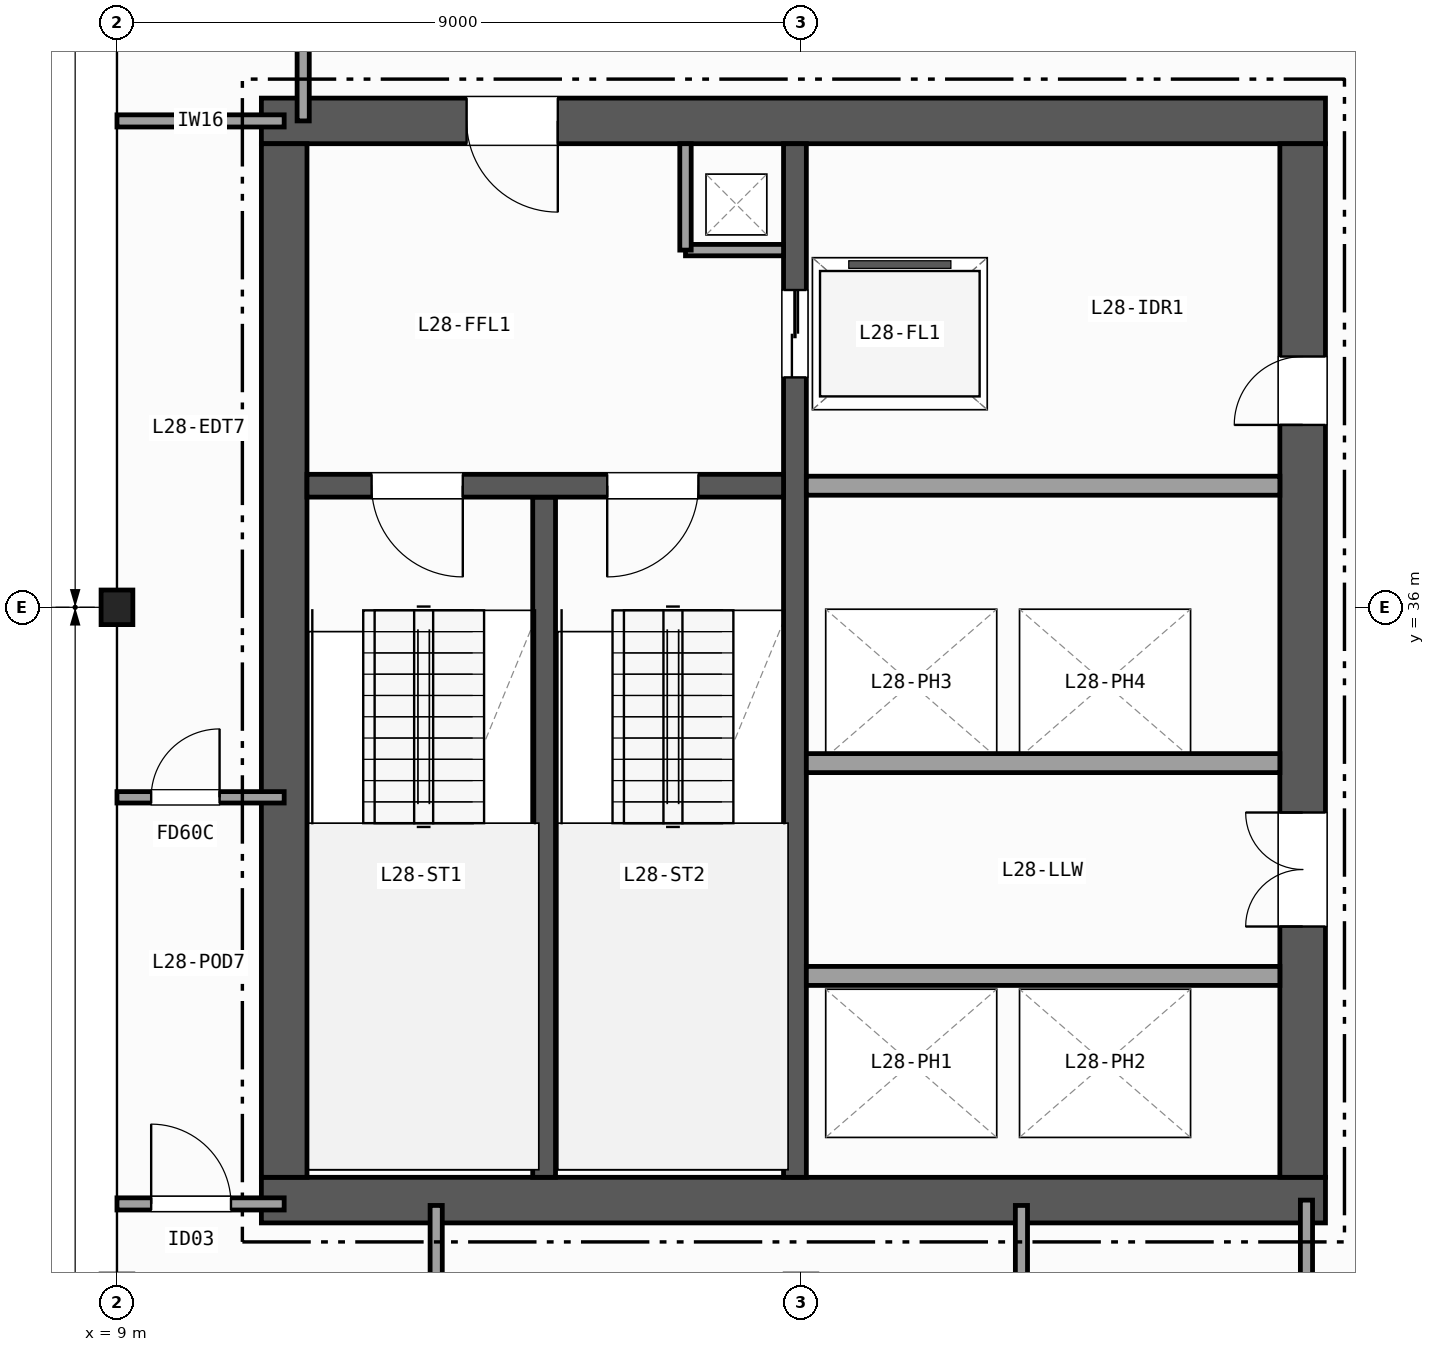
"""IFC4 building model, lengths in metres.
Left out: names, types, materials, properties, quantities, classifications, styles, units other than length and angle.
Written with IfcOpenShell. Run it as: python <this file> out.ifc"""

import sys

from ifc_helpers import new_model, si_unit, direction, frame, frame_2d, origin, origin_2d, place, context, subcontext, project, spatial, rectangle, i_section, extrude, element, fill, save


model = new_model("IFC4")
c1 = context("Model", 3, precision=1e-05, world=origin(), true_north=direction((0.0, 1.0)))
c2 = subcontext(c1, "Body", "Model", "MODEL_VIEW")
j1 = project(units=[si_unit("LENGTHUNIT", "METRE"), si_unit("PLANEANGLEUNIT", "RADIAN")], contexts=[c1])
p1 = place(None, origin())
s1 = spatial("IfcSite", under=j1, at=p1, CompositionType="ELEMENT")
p2 = place(p1, origin())
s2 = spatial("IfcBuilding", under=s1, at=p2, CompositionType="ELEMENT")
p3 = place(p2, frame((0.0, 0.0, 117.4)))
s3 = spatial("IfcBuildingStorey", under=s2, at=p3, CompositionType="ELEMENT", Elevation=117.4)
p4 = place(p3, frame((9.0, 36.0, 0.0), z_axis=(0.0, 0.0, 1.0), x_axis=(1.0, 0.0, 0.0)))
e1 = element("IfcColumn", 1, at=p4, inside=s3, PredefinedType="COLUMN", context=c2, shape_type="SweptSolid", body=[
    extrude(i_section(OverallWidth=0.418, OverallDepth=0.455, WebThickness=0.042, FlangeThickness=0.068, FilletRadius=0.015, at=origin_2d()), origin(), (0.0, 0.0, 1.0), 3.7),
])
p5 = place(p3, frame((10.9, 28.2, 0.0), z_axis=(0.0, 0.0, 1.0), x_axis=(1.0, 0.0, 0.0)))
e2 = element("IfcWall", 2, at=p5, inside=s3, PredefinedType="SHEAR", context=c2, shape_type="SweptSolid", body=[
    extrude(rectangle(XDim=14.0, YDim=0.6, at=frame_2d((7.0, 0.0))), origin(), (0.0, 0.0, 1.0), 3.42),
])
p6 = place(p3, frame((24.9, 42.4, 0.0), z_axis=(0.0, 0.0, 1.0), x_axis=(-1.0, 0.0, 0.0)))
e3 = element("IfcWall", 3, at=p6, inside=s3, PredefinedType="SHEAR", context=c2, shape_type="SweptSolid", body=[
    extrude(rectangle(XDim=14.0, YDim=0.6, at=frame_2d((7.0, 0.0))), origin(), (0.0, 0.0, 1.0), 3.42),
])
p7 = place(p6, frame((10.1, 0.0, 0.0)))
e4 = element("IfcOpeningElement", 4, at=p7, cuts=e3, PredefinedType="OPENING", context=c2, shape_type="SweptSolid", body=[
    extrude(rectangle(XDim=1.2, YDim=2.15, at=frame_2d((0.6, 1.075))), frame((0.0, 0.31, 0.0), z_axis=(0.0, -1.0, 0.0), x_axis=(1.0, 0.0, 0.0)), (0.0, 0.0, 1.0), 0.62),
])
p8 = place(p3, frame((11.2, 42.1, 0.0), z_axis=(0.0, 0.0, 1.0), x_axis=(0.0, -1.0, 0.0)))
e5 = element("IfcWall", 5, at=p8, inside=s3, PredefinedType="SHEAR", context=c2, shape_type="SweptSolid", body=[
    extrude(rectangle(XDim=13.6, YDim=0.6, at=frame_2d((6.8, 0.0))), origin(), (0.0, 0.0, 1.0), 3.42),
])
p9 = place(p3, frame((24.6, 28.5, 0.0), z_axis=(0.0, 0.0, 1.0), x_axis=(0.0, 1.0, 0.0)))
e6 = element("IfcWall", 6, at=p9, inside=s3, PredefinedType="SHEAR", context=c2, shape_type="SweptSolid", body=[
    extrude(rectangle(XDim=13.6, YDim=0.6, at=frame_2d((6.8, 0.0))), origin(), (0.0, 0.0, 1.0), 3.42),
])
p10 = place(p9, frame((3.3, 0.0, 0.0)))
e7 = element("IfcOpeningElement", 7, at=p10, cuts=e6, PredefinedType="OPENING", context=c2, shape_type="SweptSolid", body=[
    extrude(rectangle(XDim=1.5, YDim=2.2, at=frame_2d((0.75, 1.1))), frame((0.0, 0.31, 0.0), z_axis=(0.0, -1.0, 0.0), x_axis=(1.0, 0.0, 0.0)), (0.0, 0.0, 1.0), 0.62),
])
p11 = place(p9, frame((9.9, 0.0, 0.0)))
e8 = element("IfcOpeningElement", 8, at=p11, cuts=e6, PredefinedType="OPENING", context=c2, shape_type="SweptSolid", body=[
    extrude(rectangle(XDim=0.9, YDim=2.1, at=frame_2d((0.45, 1.05))), frame((0.0, 0.31, 0.0), z_axis=(0.0, -1.0, 0.0), x_axis=(1.0, 0.0, 0.0)), (0.0, 0.0, 1.0), 0.62),
])
p12 = place(p3, frame((14.62, 28.5, 0.0), z_axis=(0.0, 0.0, 1.0), x_axis=(0.0, 1.0, 0.0)))
e9 = element("IfcWall", 9, at=p12, inside=s3, PredefinedType="SHEAR", context=c2, shape_type="SweptSolid", body=[
    extrude(rectangle(XDim=8.95, YDim=0.3, at=frame_2d((4.475, 0.0))), origin(), (0.0, 0.0, 1.0), 3.42),
])
p13 = place(p3, frame((17.92, 42.1, 0.0), z_axis=(0.0, 0.0, 1.0), x_axis=(0.0, -1.0, 0.0)))
e10 = element("IfcWall", 10, at=p13, inside=s3, PredefinedType="SHEAR", context=c2, shape_type="SweptSolid", body=[
    extrude(rectangle(XDim=13.6, YDim=0.3, at=frame_2d((6.8, 0.0))), origin(), (0.0, 0.0, 1.0), 3.42),
])
p14 = place(p13, frame((1.925, 0.0, 0.0)))
e11 = element("IfcOpeningElement", 11, at=p14, cuts=e10, PredefinedType="OPENING", context=c2, shape_type="SweptSolid", body=[
    extrude(rectangle(XDim=1.15, YDim=2.15, at=frame_2d((0.575, 1.075))), frame((0.0, 0.16, 0.0), z_axis=(0.0, -1.0, 0.0), x_axis=(1.0, 0.0, 0.0)), (0.0, 0.0, 1.0), 0.32),
])
p15 = place(p3, frame((17.77, 37.6, 0.0), z_axis=(0.0, 0.0, 1.0), x_axis=(-1.0, 0.0, 0.0)))
e12 = element("IfcWall", 12, at=p15, inside=s3, PredefinedType="SHEAR", context=c2, shape_type="SweptSolid", body=[
    extrude(rectangle(XDim=6.27, YDim=0.3, at=frame_2d((3.135, 0.0))), origin(), (0.0, 0.0, 1.0), 3.42),
])
p16 = place(p15, frame((4.22, 0.0, 0.0)))
e13 = element("IfcOpeningElement", 13, at=p16, cuts=e12, PredefinedType="OPENING", context=c2, shape_type="SweptSolid", body=[
    extrude(rectangle(XDim=1.2, YDim=2.15, at=frame_2d((0.6, 1.075))), frame((0.0, 0.16, 0.0), z_axis=(0.0, -1.0, 0.0), x_axis=(1.0, 0.0, 0.0)), (0.0, 0.0, 1.0), 0.32),
])
p17 = place(p15, frame((1.12, 0.0, 0.0)))
e14 = element("IfcOpeningElement", 14, at=p17, cuts=e12, PredefinedType="OPENING", context=c2, shape_type="SweptSolid", body=[
    extrude(rectangle(XDim=1.2, YDim=2.15, at=frame_2d((0.6, 1.075))), frame((0.0, 0.16, 0.0), z_axis=(0.0, -1.0, 0.0), x_axis=(1.0, 0.0, 0.0)), (0.0, 0.0, 1.0), 0.32),
])
p18 = place(p3, frame((16.48, 40.7, 0.0), z_axis=(0.0, 0.0, 1.0), x_axis=(1.0, 0.0, 0.0)))
e15 = element("IfcWall", 15, at=p18, inside=s3, PredefinedType="PARTITIONING", context=c2, shape_type="SweptSolid", body=[
    extrude(rectangle(XDim=1.29, YDim=0.15, at=frame_2d((0.645, 0.0))), origin(), (0.0, 0.0, 1.0), 3.42),
])
p19 = place(p3, frame((16.48, 40.7, 0.0), z_axis=(0.0, 0.0, 1.0), x_axis=(0.0, 1.0, 0.0)))
e16 = element("IfcWall", 16, at=p19, inside=s3, PredefinedType="PARTITIONING", context=c2, shape_type="SweptSolid", body=[
    extrude(rectangle(XDim=1.4, YDim=0.15, at=frame_2d((0.7, 0.0))), origin(), (0.0, 0.0, 1.0), 3.42),
])
for number, where, z_axis, x_axis in (
    (17, (18.07, 37.6, 0.0), (0.0, 0.0, 1.0), (1.0, 0.0, 0.0)),
    (18, (18.07, 31.15, 0.0), (0.0, 0.0, 1.0), (1.0, 0.0, 0.0)),
    (19, (24.3, 33.95, 0.0), (0.0, 0.0, 1.0), (-1.0, 0.0, 0.0)),
):
    element("IfcWall", number, at=place(p3, frame(where, z_axis=z_axis, x_axis=x_axis)), inside=s3, PredefinedType="PARTITIONING", context=c2, shape_type="SweptSolid", body=[
        extrude(rectangle(XDim=6.23, YDim=0.25, at=frame_2d((3.115, 0.0))), origin(), (0.0, 0.0, 1.0), 3.42),
    ])
p20 = place(p3, frame((9.0, 28.15, 0.0), z_axis=(0.0, 0.0, 1.0), x_axis=(1.0, 0.0, 0.0)))
e20 = element("IfcWall", 20, at=p20, inside=s3, PredefinedType="PARTITIONING", context=c2, shape_type="SweptSolid", body=[
    extrude(rectangle(XDim=2.2, YDim=0.16, at=frame_2d((1.1, 0.0))), origin(), (0.0, 0.0, 1.0), 2.634),
])
p21 = place(p20, frame((0.45, 0.0, 0.0)))
e21 = element("IfcOpeningElement", 21, at=p21, cuts=e20, PredefinedType="OPENING", context=c2, shape_type="SweptSolid", body=[
    extrude(rectangle(XDim=1.05, YDim=2.15, at=frame_2d((0.525, 1.075))), frame((0.0, 0.09, 0.0), z_axis=(0.0, -1.0, 0.0), x_axis=(1.0, 0.0, 0.0)), (0.0, 0.0, 1.0), 0.18),
])
p22 = place(p3, frame((9.0, 42.4, 0.0), z_axis=(0.0, 0.0, 1.0), x_axis=(1.0, 0.0, 0.0)))
e22 = element("IfcWall", 22, at=p22, inside=s3, PredefinedType="PARTITIONING", context=c2, shape_type="SweptSolid", body=[
    extrude(rectangle(XDim=2.2, YDim=0.16, at=frame_2d((1.1, 0.0))), origin(), (0.0, 0.0, 1.0), 2.634),
])
p23 = place(p3, frame((11.45, 42.4, 0.0), z_axis=(0.0, 0.0, 1.0), x_axis=(0.0, 1.0, 0.0)))
e23 = element("IfcWall", 23, at=p23, inside=s3, PredefinedType="PARTITIONING", context=c2, shape_type="SweptSolid", body=[
    extrude(rectangle(XDim=2.1, YDim=0.16, at=frame_2d((1.05, 0.0))), origin(), (0.0, 0.0, 1.0), 3.42),
])
p24 = place(p3, frame((9.0, 33.5, 0.0), z_axis=(0.0, 0.0, 1.0), x_axis=(1.0, 0.0, 0.0)))
e24 = element("IfcWall", 24, at=p24, inside=s3, PredefinedType="PARTITIONING", context=c2, shape_type="SweptSolid", body=[
    extrude(rectangle(XDim=2.2, YDim=0.15, at=frame_2d((1.1, 0.0))), origin(), (0.0, 0.0, 1.0), 2.634),
])
p25 = place(p24, frame((0.45, 0.0, 0.0)))
e25 = element("IfcOpeningElement", 25, at=p25, cuts=e24, PredefinedType="OPENING", context=c2, shape_type="SweptSolid", body=[
    extrude(rectangle(XDim=0.9, YDim=2.1, at=frame_2d((0.45, 1.05))), frame((0.0, 0.085, 0.0), z_axis=(0.0, -1.0, 0.0), x_axis=(1.0, 0.0, 0.0)), (0.0, 0.0, 1.0), 0.17),
])
p26 = place(p3, frame((24.65, 9.0, 0.0), z_axis=(0.0, 0.0, 1.0), x_axis=(0.0, 1.0, 0.0)))
e26 = element("IfcWall", 26, at=p26, inside=s3, PredefinedType="PARTITIONING", context=c2, shape_type="SweptSolid", body=[
    extrude(rectangle(XDim=19.2, YDim=0.16, at=frame_2d((9.6, 0.0))), origin(), (0.0, 0.0, 1.0), 2.634),
])
p27 = place(p26, frame((12.2, 0.0, 0.0)))
e27 = element("IfcOpeningElement", 27, at=p27, cuts=e26, PredefinedType="OPENING", context=c2, shape_type="SweptSolid", body=[
    extrude(rectangle(XDim=0.86, YDim=2.05, at=frame_2d((0.43, 1.025))), frame((0.0, 0.09, 0.0), z_axis=(0.0, -1.0, 0.0), x_axis=(1.0, 0.0, 0.0)), (0.0, 0.0, 1.0), 0.18),
])
p28 = place(p26, frame((4.2, 0.0, 0.0)))
e28 = element("IfcOpeningElement", 28, at=p28, cuts=e26, PredefinedType="OPENING", context=c2, shape_type="SweptSolid", body=[
    extrude(rectangle(XDim=0.95, YDim=2.1, at=frame_2d((0.475, 1.05))), frame((0.0, 0.09, 0.0), z_axis=(0.0, -1.0, 0.0), x_axis=(1.0, 0.0, 0.0)), (0.0, 0.0, 1.0), 0.18),
])
p29 = place(p3, frame((13.2, 18.0, 0.0), z_axis=(0.0, 0.0, 1.0), x_axis=(0.0, 1.0, 0.0)))
e29 = element("IfcWall", 29, at=p29, inside=s3, PredefinedType="PARTITIONING", context=c2, shape_type="SweptSolid", body=[
    extrude(rectangle(XDim=10.13, YDim=0.16, at=frame_2d((5.065, 0.0))), origin(), (0.0, 0.0, 1.0), 2.789),
])
p30 = place(p29, frame((2.5, 0.0, 0.0)))
e30 = element("IfcOpeningElement", 30, at=p30, cuts=e29, PredefinedType="OPENING", context=c2, shape_type="SweptSolid", body=[
    extrude(rectangle(XDim=1.0, YDim=2.1, at=frame_2d((0.5, 1.05))), frame((0.0, 0.09, 0.0), z_axis=(0.0, -1.0, 0.0), x_axis=(1.0, 0.0, 0.0)), (0.0, 0.0, 1.0), 0.18),
])
p31 = place(p3, frame((20.9, 18.0, 0.0), z_axis=(0.0, 0.0, 1.0), x_axis=(0.0, 1.0, 0.0)))
e31 = element("IfcWall", 31, at=p31, inside=s3, PredefinedType="PARTITIONING", context=c2, shape_type="SweptSolid", body=[
    extrude(rectangle(XDim=10.13, YDim=0.16, at=frame_2d((5.065, 0.0))), origin(), (0.0, 0.0, 1.0), 2.789),
])
p32 = place(p31, frame((2.5, 0.0, 0.0)))
e32 = element("IfcOpeningElement", 32, at=p32, cuts=e31, PredefinedType="OPENING", context=c2, shape_type="SweptSolid", body=[
    extrude(rectangle(XDim=1.05, YDim=2.15, at=frame_2d((0.525, 1.075))), frame((0.0, 0.09, 0.0), z_axis=(0.0, -1.0, 0.0), x_axis=(1.0, 0.0, 0.0)), (0.0, 0.0, 1.0), 0.18),
])
p33 = place(p16, origin())
e33 = element("IfcDoor", 33, at=p33, inside=s3, OperationType="SINGLE_SWING_LEFT", PredefinedType="DOOR", context=c2, shape_type="SweptSolid", body=[
    extrude(rectangle(XDim=1.2, YDim=2.15, at=frame_2d((0.6, 1.075))), frame((0.0, 0.025, 0.0), z_axis=(0.0, -1.0, 0.0), x_axis=(1.0, 0.0, 0.0)), (0.0, 0.0, 1.0), 0.05),
])
fill(e13, e33)
p34 = place(p17, origin())
e34 = element("IfcDoor", 34, at=p34, inside=s3, OperationType="SINGLE_SWING_RIGHT", PredefinedType="DOOR", context=c2, shape_type="SweptSolid", body=[
    extrude(rectangle(XDim=1.2, YDim=2.15, at=frame_2d((0.6, 1.075))), frame((0.0, 0.025, 0.0), z_axis=(0.0, -1.0, 0.0), x_axis=(1.0, 0.0, 0.0)), (0.0, 0.0, 1.0), 0.05),
])
fill(e14, e34)
p35 = place(p10, origin())
e35 = element("IfcDoor", 35, at=p35, inside=s3, OperationType="DOUBLE_DOOR_SINGLE_SWING", PredefinedType="DOOR", context=c2, shape_type="SweptSolid", body=[
    extrude(rectangle(XDim=1.5, YDim=2.2, at=frame_2d((0.75, 1.1))), frame((0.0, 0.025, 0.0), z_axis=(0.0, -1.0, 0.0), x_axis=(1.0, 0.0, 0.0)), (0.0, 0.0, 1.0), 0.05),
])
fill(e7, e35)
p36 = place(p7, origin())
e36 = element("IfcDoor", 36, at=p36, inside=s3, OperationType="SINGLE_SWING_LEFT", PredefinedType="DOOR", context=c2, shape_type="SweptSolid", body=[
    extrude(rectangle(XDim=1.2, YDim=2.15, at=frame_2d((0.6, 1.075))), frame((0.0, 0.025, 0.0), z_axis=(0.0, -1.0, 0.0), x_axis=(1.0, 0.0, 0.0)), (0.0, 0.0, 1.0), 0.05),
])
fill(e4, e36)
p37 = place(p11, origin())
e37 = element("IfcDoor", 37, at=p37, inside=s3, OperationType="SINGLE_SWING_LEFT", PredefinedType="DOOR", context=c2, shape_type="SweptSolid", body=[
    extrude(rectangle(XDim=0.9, YDim=2.1, at=frame_2d((0.45, 1.05))), frame((0.0, 0.025, 0.0), z_axis=(0.0, -1.0, 0.0), x_axis=(1.0, 0.0, 0.0)), (0.0, 0.0, 1.0), 0.05),
])
fill(e8, e37)
p38 = place(p14, origin())
e38 = element("IfcDoor", 38, at=p38, inside=s3, OperationType="DOUBLE_DOOR_SLIDING", PredefinedType="DOOR", context=c2, shape_type="SweptSolid", body=[
    extrude(rectangle(XDim=1.15, YDim=2.15, at=frame_2d((0.575, 1.075))), frame((0.0, 0.025, 0.0), z_axis=(0.0, -1.0, 0.0), x_axis=(1.0, 0.0, 0.0)), (0.0, 0.0, 1.0), 0.05),
])
fill(e11, e38)
p39 = place(p21, origin())
e39 = element("IfcDoor", 39, at=p39, inside=s3, OperationType="SINGLE_SWING_LEFT", PredefinedType="DOOR", context=c2, shape_type="SweptSolid", body=[
    extrude(rectangle(XDim=1.05, YDim=2.15, at=frame_2d((0.525, 1.075))), frame((0.0, 0.025, 0.0), z_axis=(0.0, -1.0, 0.0), x_axis=(1.0, 0.0, 0.0)), (0.0, 0.0, 1.0), 0.05),
])
fill(e21, e39)
p40 = place(p25, origin())
e40 = element("IfcDoor", 40, at=p40, inside=s3, OperationType="SINGLE_SWING_RIGHT", PredefinedType="DOOR", context=c2, shape_type="SweptSolid", body=[
    extrude(rectangle(XDim=0.9, YDim=2.1, at=frame_2d((0.45, 1.05))), frame((0.0, 0.025, 0.0), z_axis=(0.0, -1.0, 0.0), x_axis=(1.0, 0.0, 0.0)), (0.0, 0.0, 1.0), 0.05),
])
fill(e25, e40)
save(model, sys.argv[1])
